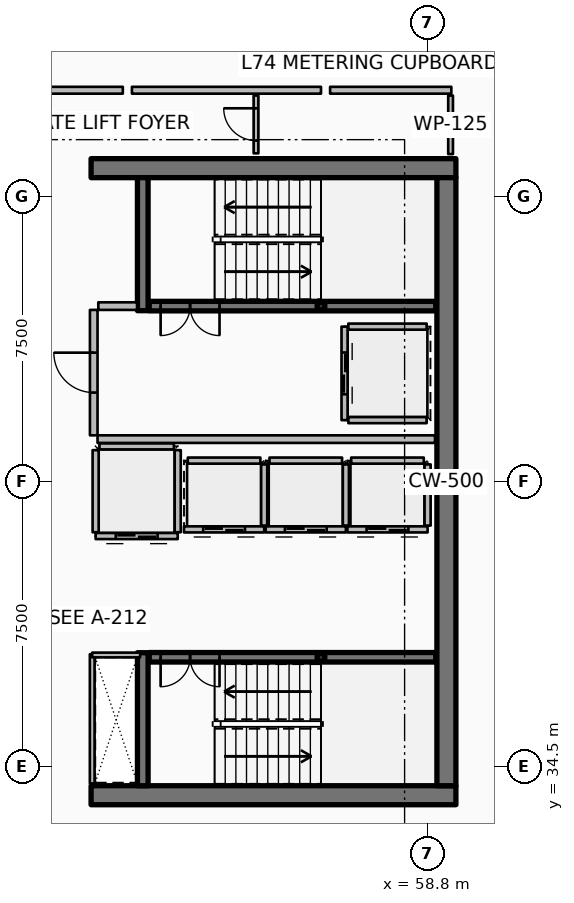
"""IFC4 building model, lengths in metres.
Left out: names, types, materials, properties, quantities, classifications, styles, units other than length and angle.
Written with IfcOpenShell. Run it as: python <this file> out.ifc"""

import sys

from ifc_helpers import new_model, si_unit, direction, frame, frame_2d, origin, origin_2d, place, context, subcontext, project, spatial, rectangle, hollow_rectangle, extrude, element, fill, save


model = new_model("IFC4")
c1 = context("Model", 3, precision=1e-05, world=origin(), true_north=direction((0.0, 1.0)))
c2 = subcontext(c1, "Body", "Model", "MODEL_VIEW")
j1 = project(units=[si_unit("LENGTHUNIT", "METRE"), si_unit("PLANEANGLEUNIT", "RADIAN")], contexts=[c1])
p1 = place(None, origin())
s1 = spatial("IfcSite", under=j1, at=p1, CompositionType="ELEMENT")
p2 = place(p1, origin())
s2 = spatial("IfcBuilding", under=s1, at=p2, CompositionType="ELEMENT")
p3 = place(p2, frame((0.0, 0.0, 294.45)))
s3 = spatial("IfcBuildingStorey", under=s2, at=p3, CompositionType="ELEMENT", Elevation=294.45)
for number, where, z_axis, x_axis in (
    (1, (49.95, 33.75, 0.0), (0.0, 0.0, 1.0), (1.0, 0.0, 0.0)),
    (2, (49.95, 50.25, 0.0), (0.0, 0.0, 1.0), (1.0, 0.0, 0.0)),
):
    element("IfcWall", number, at=place(p3, frame(where, z_axis=z_axis, x_axis=x_axis)), inside=s3, PredefinedType="SHEAR", context=c2, shape_type="SweptSolid", body=[
        extrude(rectangle(XDim=9.6, YDim=0.5, at=frame_2d((4.8, 0.0))), origin(), (0.0, 0.0, 1.0), 3.85),
    ])
p4 = place(p3, frame((59.3, 34.0, 0.0), z_axis=(0.0, 0.0, 1.0), x_axis=(0.0, 1.0, 0.0)))
e3 = element("IfcWall", 3, at=p4, inside=s3, PredefinedType="SHEAR", context=c2, shape_type="SweptSolid", body=[
    extrude(rectangle(XDim=16.0, YDim=0.5, at=frame_2d((8.0, 0.0))), origin(), (0.0, 0.0, 1.0), 3.85),
])
for number, where, z_axis, x_axis in (
    (4, (51.31, 46.5, 0.0), (0.0, 0.0, 1.0), (0.0, 1.0, 0.0)),
    (5, (51.31, 34.0, 0.0), (0.0, 0.0, 1.0), (0.0, 1.0, 0.0)),
):
    element("IfcWall", number, at=place(p3, frame(where, z_axis=z_axis, x_axis=x_axis)), inside=s3, PredefinedType="SHEAR", context=c2, shape_type="SweptSolid", body=[
        extrude(rectangle(XDim=3.5, YDim=0.28, at=frame_2d((1.75, 0.0))), origin(), (0.0, 0.0, 1.0), 3.85),
    ])
for number, where, z_axis, x_axis in (
    (6, (56.0, 46.62, 0.0), (0.0, 0.0, 1.0), (1.0, 0.0, 0.0)),
    (7, (56.0, 37.38, 0.0), (0.0, 0.0, 1.0), (1.0, 0.0, 0.0)),
):
    element("IfcColumn", number, at=place(p3, frame(where, z_axis=z_axis, x_axis=x_axis)), inside=s3, PredefinedType="COLUMN", context=c2, shape_type="SweptSolid", body=[
        extrude(hollow_rectangle(XDim=0.2, YDim=0.2, WallThickness=0.01, InnerFilletRadius=0.01, OuterFilletRadius=0.02, at=origin_2d()), origin(), (0.0, 0.0, 1.0), 1.72),
    ])
p5 = place(p3, frame((51.48, 46.62, 0.0), z_axis=(0.0, 0.0, 1.0), x_axis=(1.0, 0.0, 0.0)))
e8 = element("IfcWall", 8, at=p5, inside=s3, PredefinedType="SOLIDWALL", context=c2, shape_type="SweptSolid", body=[
    extrude(rectangle(XDim=7.54, YDim=0.25, at=frame_2d((3.77, 0.0))), origin(), (0.0, 0.0, 1.0), 3.59),
])
p6 = place(p5, frame((0.3, 0.0, 0.0)))
e9 = element("IfcOpeningElement", 9, at=p6, cuts=e8, PredefinedType="OPENING", context=c2, shape_type="SweptSolid", body=[
    extrude(rectangle(XDim=1.55, YDim=2.15, at=frame_2d((0.775, 1.075))), frame((0.0, 0.135, 0.0), z_axis=(0.0, -1.0, 0.0), x_axis=(1.0, 0.0, 0.0)), (0.0, 0.0, 1.0), 0.27),
])
p7 = place(p3, frame((51.48, 37.38, 0.0), z_axis=(0.0, 0.0, 1.0), x_axis=(1.0, 0.0, 0.0)))
e10 = element("IfcWall", 10, at=p7, inside=s3, PredefinedType="SOLIDWALL", context=c2, shape_type="SweptSolid", body=[
    extrude(rectangle(XDim=7.54, YDim=0.25, at=frame_2d((3.77, 0.0))), origin(), (0.0, 0.0, 1.0), 3.59),
])
p8 = place(p7, frame((0.3, 0.0, 0.0)))
e11 = element("IfcOpeningElement", 11, at=p8, cuts=e10, PredefinedType="OPENING", context=c2, shape_type="SweptSolid", body=[
    extrude(rectangle(XDim=1.55, YDim=2.15, at=frame_2d((0.775, 1.075))), frame((0.0, 0.135, 0.0), z_axis=(0.0, -1.0, 0.0), x_axis=(1.0, 0.0, 0.0)), (0.0, 0.0, 1.0), 0.27),
])
p9 = place(p3, frame((54.505, 40.745, 0.0), z_axis=(0.0, 0.0, 1.0), x_axis=(-1.0, 0.0, 0.0)))
e12 = element("IfcWall", 12, at=p9, inside=s3, PredefinedType="PARTITIONING", context=c2, shape_type="SweptSolid", body=[
    extrude(rectangle(XDim=2.11, YDim=0.16, at=frame_2d((1.055, 0.0))), origin(), (0.0, 0.0, 1.0), 3.59),
])
p10 = place(p9, frame((0.505, 0.0, 0.0)))
e13 = element("IfcOpeningElement", 13, at=p10, cuts=e12, PredefinedType="OPENING", context=c2, shape_type="SweptSolid", body=[
    extrude(rectangle(XDim=1.1, YDim=2.1, at=frame_2d((0.55, 1.05))), frame((0.0, 0.09, 0.0), z_axis=(0.0, -1.0, 0.0), x_axis=(1.0, 0.0, 0.0)), (0.0, 0.0, 1.0), 0.18),
])
p11 = place(p3, frame((54.505, 40.845, 0.0), z_axis=(0.0, 0.0, 1.0), x_axis=(0.0, 1.0, 0.0)))
e14 = element("IfcWall", 14, at=p11, inside=s3, PredefinedType="PARTITIONING", context=c2, shape_type="SweptSolid", body=[
    extrude(rectangle(XDim=1.61, YDim=0.16, at=frame_2d((0.805, 0.0))), origin(), (0.0, 0.0, 1.0), 3.59),
])
p12 = place(p3, frame((52.495, 42.555, 0.0), z_axis=(0.0, 0.0, 1.0), x_axis=(1.0, 0.0, 0.0)))
e15 = element("IfcWall", 15, at=p12, inside=s3, PredefinedType="PARTITIONING", context=c2, shape_type="SweptSolid", body=[
    extrude(rectangle(XDim=1.91, YDim=0.16, at=frame_2d((0.955, 0.0))), origin(), (0.0, 0.0, 1.0), 3.59),
])
p13 = place(p3, frame((56.655, 40.745, 0.0), z_axis=(0.0, 0.0, 1.0), x_axis=(-1.0, 0.0, 0.0)))
e16 = element("IfcWall", 16, at=p13, inside=s3, PredefinedType="PARTITIONING", context=c2, shape_type="SweptSolid", body=[
    extrude(rectangle(XDim=2.11, YDim=0.16, at=frame_2d((1.055, 0.0))), origin(), (0.0, 0.0, 1.0), 3.59),
])
p14 = place(p13, frame((0.505, 0.0, 0.0)))
e17 = element("IfcOpeningElement", 17, at=p14, cuts=e16, PredefinedType="OPENING", context=c2, shape_type="SweptSolid", body=[
    extrude(rectangle(XDim=1.1, YDim=2.1, at=frame_2d((0.55, 1.05))), frame((0.0, 0.09, 0.0), z_axis=(0.0, -1.0, 0.0), x_axis=(1.0, 0.0, 0.0)), (0.0, 0.0, 1.0), 0.18),
])
p15 = place(p3, frame((56.655, 40.845, 0.0), z_axis=(0.0, 0.0, 1.0), x_axis=(0.0, 1.0, 0.0)))
e18 = element("IfcWall", 18, at=p15, inside=s3, PredefinedType="PARTITIONING", context=c2, shape_type="SweptSolid", body=[
    extrude(rectangle(XDim=1.61, YDim=0.16, at=frame_2d((0.805, 0.0))), origin(), (0.0, 0.0, 1.0), 3.59),
])
p16 = place(p3, frame((54.645, 42.555, 0.0), z_axis=(0.0, 0.0, 1.0), x_axis=(1.0, 0.0, 0.0)))
e19 = element("IfcWall", 19, at=p16, inside=s3, PredefinedType="PARTITIONING", context=c2, shape_type="SweptSolid", body=[
    extrude(rectangle(XDim=1.91, YDim=0.16, at=frame_2d((0.955, 0.0))), origin(), (0.0, 0.0, 1.0), 3.59),
])
p17 = place(p3, frame((58.805, 40.745, 0.0), z_axis=(0.0, 0.0, 1.0), x_axis=(-1.0, 0.0, 0.0)))
e20 = element("IfcWall", 20, at=p17, inside=s3, PredefinedType="PARTITIONING", context=c2, shape_type="SweptSolid", body=[
    extrude(rectangle(XDim=2.11, YDim=0.16, at=frame_2d((1.055, 0.0))), origin(), (0.0, 0.0, 1.0), 3.59),
])
p18 = place(p17, frame((0.505, 0.0, 0.0)))
e21 = element("IfcOpeningElement", 21, at=p18, cuts=e20, PredefinedType="OPENING", context=c2, shape_type="SweptSolid", body=[
    extrude(rectangle(XDim=1.1, YDim=2.1, at=frame_2d((0.55, 1.05))), frame((0.0, 0.09, 0.0), z_axis=(0.0, -1.0, 0.0), x_axis=(1.0, 0.0, 0.0)), (0.0, 0.0, 1.0), 0.18),
])
p19 = place(p3, frame((58.805, 40.845, 0.0), z_axis=(0.0, 0.0, 1.0), x_axis=(0.0, 1.0, 0.0)))
e22 = element("IfcWall", 22, at=p19, inside=s3, PredefinedType="PARTITIONING", context=c2, shape_type="SweptSolid", body=[
    extrude(rectangle(XDim=1.61, YDim=0.16, at=frame_2d((0.805, 0.0))), origin(), (0.0, 0.0, 1.0), 3.59),
])
p20 = place(p3, frame((56.795, 42.555, 0.0), z_axis=(0.0, 0.0, 1.0), x_axis=(1.0, 0.0, 0.0)))
e23 = element("IfcWall", 23, at=p20, inside=s3, PredefinedType="PARTITIONING", context=c2, shape_type="SweptSolid", body=[
    extrude(rectangle(XDim=1.91, YDim=0.16, at=frame_2d((0.955, 0.0))), origin(), (0.0, 0.0, 1.0), 3.59),
])
p21 = place(p3, frame((56.62, 46.08, 0.0), z_axis=(0.0, 0.0, 1.0), x_axis=(0.0, -1.0, 0.0)))
e24 = element("IfcWall", 24, at=p21, inside=s3, PredefinedType="PARTITIONING", context=c2, shape_type="SweptSolid", body=[
    extrude(rectangle(XDim=2.46, YDim=0.16, at=frame_2d((1.23, 0.0))), origin(), (0.0, 0.0, 1.0), 3.59),
])
p22 = place(p21, frame((0.68, 0.0, 0.0)))
e25 = element("IfcOpeningElement", 25, at=p22, cuts=e24, PredefinedType="OPENING", context=c2, shape_type="SweptSolid", body=[
    extrude(rectangle(XDim=1.1, YDim=2.1, at=frame_2d((0.55, 1.05))), frame((0.0, 0.09, 0.0), z_axis=(0.0, -1.0, 0.0), x_axis=(1.0, 0.0, 0.0)), (0.0, 0.0, 1.0), 0.18),
])
for number, where, z_axis, x_axis in (
    (26, (56.72, 46.08, 0.0), (0.0, 0.0, 1.0), (1.0, 0.0, 0.0)),
    (27, (56.72, 43.62, 0.0), (0.0, 0.0, 1.0), (1.0, 0.0, 0.0)),
):
    element("IfcWall", number, at=place(p3, frame(where, z_axis=z_axis, x_axis=x_axis)), inside=s3, PredefinedType="PARTITIONING", context=c2, shape_type="SweptSolid", body=[
        extrude(rectangle(XDim=2.06, YDim=0.16, at=frame_2d((1.03, 0.0))), origin(), (0.0, 0.0, 1.0), 3.59),
    ])
p23 = place(p3, frame((52.23, 40.57, 0.0), z_axis=(0.0, 0.0, 1.0), x_axis=(-1.0, 0.0, 0.0)))
e28 = element("IfcWall", 28, at=p23, inside=s3, PredefinedType="PARTITIONING", context=c2, shape_type="SweptSolid", body=[
    extrude(rectangle(XDim=2.16, YDim=0.16, at=frame_2d((1.08, 0.0))), origin(), (0.0, 0.0, 1.0), 3.59),
])
p24 = place(p23, frame((0.53, 0.0, 0.0)))
e29 = element("IfcOpeningElement", 29, at=p24, cuts=e28, PredefinedType="OPENING", context=c2, shape_type="SweptSolid", body=[
    extrude(rectangle(XDim=1.1, YDim=2.1, at=frame_2d((0.55, 1.05))), frame((0.0, 0.09, 0.0), z_axis=(0.0, -1.0, 0.0), x_axis=(1.0, 0.0, 0.0)), (0.0, 0.0, 1.0), 0.18),
])
for number, where, z_axis, x_axis in (
    (30, (52.23, 40.67, 0.0), (0.0, 0.0, 1.0), (0.0, 1.0, 0.0)),
    (31, (50.07, 40.67, 0.0), (0.0, 0.0, 1.0), (0.0, 1.0, 0.0)),
):
    element("IfcWall", number, at=place(p3, frame(where, z_axis=z_axis, x_axis=x_axis)), inside=s3, PredefinedType="PARTITIONING", context=c2, shape_type="SweptSolid", body=[
        extrude(rectangle(XDim=2.16, YDim=0.16, at=frame_2d((1.08, 0.0))), origin(), (0.0, 0.0, 1.0), 3.59),
    ])
p25 = place(p3, frame((50.17, 42.93, 0.0), z_axis=(0.0, 0.0, 1.0), x_axis=(1.0, 0.0, 0.0)))
e32 = element("IfcWall", 32, at=p25, inside=s3, PredefinedType="PARTITIONING", context=c2, shape_type="SweptSolid", body=[
    extrude(rectangle(XDim=1.96, YDim=0.16, at=frame_2d((0.98, 0.0))), origin(), (0.0, 0.0, 1.0), 3.59),
])
p26 = place(p3, frame((50.12, 43.12, 0.0), z_axis=(0.0, 0.0, 1.0), x_axis=(1.0, 0.0, 0.0)))
e33 = element("IfcWall", 33, at=p26, inside=s3, PredefinedType="PARTITIONING", context=c2, shape_type="SweptSolid", body=[
    extrude(rectangle(XDim=8.88, YDim=0.2, at=frame_2d((4.44, 0.0))), origin(), (0.0, 0.0, 1.0), 3.59),
])
p27 = place(p3, frame((50.14, 46.62, 0.0), z_axis=(0.0, 0.0, 1.0), x_axis=(1.0, 0.0, 0.0)))
e34 = element("IfcWall", 34, at=p27, inside=s3, PredefinedType="PARTITIONING", context=c2, shape_type="SweptSolid", body=[
    extrude(rectangle(XDim=1.02, YDim=0.2, at=frame_2d((0.51, 0.0))), origin(), (0.0, 0.0, 1.0), 3.59),
])
p28 = place(p3, frame((50.02, 43.22, 0.0), z_axis=(0.0, 0.0, 1.0), x_axis=(0.0, 1.0, 0.0)))
e35 = element("IfcWall", 35, at=p28, inside=s3, PredefinedType="PARTITIONING", context=c2, shape_type="SweptSolid", body=[
    extrude(rectangle(XDim=3.3, YDim=0.2, at=frame_2d((1.65, 0.0))), origin(), (0.0, 0.0, 1.0), 3.59),
])
p29 = place(p28, frame((1.125, 0.0, 0.0)))
e36 = element("IfcOpeningElement", 36, at=p29, cuts=e35, PredefinedType="OPENING", context=c2, shape_type="SweptSolid", body=[
    extrude(rectangle(XDim=1.05, YDim=2.1, at=frame_2d((0.525, 1.05))), frame((0.0, 0.11, 0.0), z_axis=(0.0, -1.0, 0.0), x_axis=(1.0, 0.0, 0.0)), (0.0, 0.0, 1.0), 0.22),
])
p30 = place(p3, frame((49.98, 34.06, 0.0), z_axis=(0.0, 0.0, 1.0), x_axis=(0.0, 1.0, 0.0)))
e37 = element("IfcWall", 37, at=p30, inside=s3, PredefinedType="PARTITIONING", context=c2, shape_type="SweptSolid", body=[
    extrude(rectangle(XDim=3.4, YDim=0.125, at=frame_2d((1.7, 0.0))), origin(), (0.0, 0.0, 1.0), 3.03),
])
p31 = place(p3, frame((49.98, 37.44, 0.0), z_axis=(0.0, 0.0, 1.0), x_axis=(1.0, 0.0, 0.0)))
e38 = element("IfcWall", 38, at=p31, inside=s3, PredefinedType="PARTITIONING", context=c2, shape_type="SweptSolid", body=[
    extrude(rectangle(XDim=1.26, YDim=0.125, at=frame_2d((0.63, 0.0))), origin(), (0.0, 0.0, 1.0), 3.03),
])
p32 = place(p3, frame((59.41, 50.62, 0.0), z_axis=(0.0, 0.0, 1.0), x_axis=(0.0, 1.0, 0.0)))
e39 = element("IfcWall", 39, at=p32, inside=s3, PredefinedType="PARTITIONING", context=c2, shape_type="SweptSolid", body=[
    extrude(rectangle(XDim=1.54, YDim=0.125, at=frame_2d((0.77, 0.0))), origin(), (0.0, 0.0, 1.0), 3.03),
])
p33 = place(p3, frame((54.29, 50.64, 0.0), z_axis=(0.0, 0.0, 1.0), x_axis=(0.0, 1.0, 0.0)))
e40 = element("IfcWall", 40, at=p33, inside=s3, PredefinedType="PARTITIONING", context=c2, shape_type="SweptSolid", body=[
    extrude(rectangle(XDim=1.52, YDim=0.125, at=frame_2d((0.76, 0.0))), origin(), (0.0, 0.0, 1.0), 3.03),
])
p34 = place(p33, frame((0.335, 0.0, 0.0)))
e41 = element("IfcOpeningElement", 41, at=p34, cuts=e40, PredefinedType="OPENING", context=c2, shape_type="SweptSolid", body=[
    extrude(rectangle(XDim=0.85, YDim=2.06, at=frame_2d((0.425, 1.03))), frame((0.0, 0.073, 0.0), z_axis=(0.0, -1.0, 0.0), x_axis=(1.0, 0.0, 0.0)), (0.0, 0.0, 1.0), 0.145),
])
p35 = place(p3, frame((59.43, 52.3, 0.0), z_axis=(0.0, 0.0, 1.0), x_axis=(-1.0, 0.0, 0.0)))
e42 = element("IfcWall", 42, at=p35, inside=s3, PredefinedType="PARTITIONING", context=c2, shape_type="SweptSolid", body=[
    extrude(rectangle(XDim=3.19, YDim=0.18, at=frame_2d((1.595, 0.0))), origin(), (0.0, 0.0, 1.0), 2.957),
])
p36 = place(p3, frame((62.579, 52.938, 0.0), z_axis=(0.0, 0.0, 1.0), x_axis=(-0.697017998251, 0.717053631268, 0.0)))
e43 = element("IfcWall", 43, at=p36, inside=s3, PredefinedType="PARTITIONING", context=c2, shape_type="SweptSolid", body=[
    extrude(rectangle(XDim=4.618, YDim=0.125, at=frame_2d((2.309, 0.0))), origin(), (0.0, 0.0, 1.0), 2.957),
])
p37 = place(p36, frame((1.859, 0.0, 0.0)))
e44 = element("IfcOpeningElement", 44, at=p37, cuts=e43, PredefinedType="OPENING", context=c2, shape_type="SweptSolid", body=[
    extrude(rectangle(XDim=0.9, YDim=2.08, at=frame_2d((0.45, 1.04))), frame((0.0, 0.073, 0.0), z_axis=(0.0, -1.0, 0.0), x_axis=(1.0, 0.0, 0.0)), (0.0, 0.0, 1.0), 0.145),
])
p38 = place(p3, frame((56.0, 52.3, 0.0), z_axis=(0.0, 0.0, 1.0), x_axis=(-1.0, 0.0, 0.0)))
e45 = element("IfcWall", 45, at=p38, inside=s3, PredefinedType="PARTITIONING", context=c2, shape_type="SweptSolid", body=[
    extrude(rectangle(XDim=4.975, YDim=0.18, at=frame_2d((2.488, 0.0))), origin(), (0.0, 0.0, 1.0), 2.957),
])
p39 = place(p3, frame((50.785, 52.3, 0.0), z_axis=(0.0, 0.0, 1.0), x_axis=(-1.0, 0.0, 0.0)))
e46 = element("IfcWall", 46, at=p39, inside=s3, PredefinedType="PARTITIONING", context=c2, shape_type="SweptSolid", body=[
    extrude(rectangle(XDim=3.884, YDim=0.18, at=frame_2d((1.942, 0.0))), origin(), (0.0, 0.0, 1.0), 2.957),
])
p40 = place(p6, origin())
e47 = element("IfcDoor", 47, at=p40, inside=s3, OperationType="DOUBLE_DOOR_SINGLE_SWING", PredefinedType="DOOR", context=c2, shape_type="SweptSolid", body=[
    extrude(rectangle(XDim=1.55, YDim=2.15, at=frame_2d((0.775, 1.075))), frame((0.0, 0.025, 0.0), z_axis=(0.0, -1.0, 0.0), x_axis=(1.0, 0.0, 0.0)), (0.0, 0.0, 1.0), 0.05),
])
fill(e9, e47)
p41 = place(p8, origin())
e48 = element("IfcDoor", 48, at=p41, inside=s3, OperationType="DOUBLE_DOOR_SINGLE_SWING", PredefinedType="DOOR", context=c2, shape_type="SweptSolid", body=[
    extrude(rectangle(XDim=1.55, YDim=2.15, at=frame_2d((0.775, 1.075))), frame((0.0, 0.025, 0.0), z_axis=(0.0, -1.0, 0.0), x_axis=(1.0, 0.0, 0.0)), (0.0, 0.0, 1.0), 0.05),
])
fill(e11, e48)
p42 = place(p10, origin())
e49 = element("IfcDoor", 49, at=p42, inside=s3, OperationType="DOUBLE_DOOR_SLIDING", PredefinedType="DOOR", context=c2, shape_type="SweptSolid", body=[
    extrude(rectangle(XDim=1.1, YDim=2.1, at=frame_2d((0.55, 1.05))), frame((0.0, 0.025, 0.0), z_axis=(0.0, -1.0, 0.0), x_axis=(1.0, 0.0, 0.0)), (0.0, 0.0, 1.0), 0.05),
])
fill(e13, e49)
p43 = place(p14, origin())
e50 = element("IfcDoor", 50, at=p43, inside=s3, OperationType="DOUBLE_DOOR_SLIDING", PredefinedType="DOOR", context=c2, shape_type="SweptSolid", body=[
    extrude(rectangle(XDim=1.1, YDim=2.1, at=frame_2d((0.55, 1.05))), frame((0.0, 0.025, 0.0), z_axis=(0.0, -1.0, 0.0), x_axis=(1.0, 0.0, 0.0)), (0.0, 0.0, 1.0), 0.05),
])
fill(e17, e50)
p44 = place(p18, origin())
e51 = element("IfcDoor", 51, at=p44, inside=s3, OperationType="DOUBLE_DOOR_SLIDING", PredefinedType="DOOR", context=c2, shape_type="SweptSolid", body=[
    extrude(rectangle(XDim=1.1, YDim=2.1, at=frame_2d((0.55, 1.05))), frame((0.0, 0.025, 0.0), z_axis=(0.0, -1.0, 0.0), x_axis=(1.0, 0.0, 0.0)), (0.0, 0.0, 1.0), 0.05),
])
fill(e21, e51)
p45 = place(p22, origin())
e52 = element("IfcDoor", 52, at=p45, inside=s3, OperationType="DOUBLE_DOOR_SLIDING", PredefinedType="DOOR", context=c2, shape_type="SweptSolid", body=[
    extrude(rectangle(XDim=1.1, YDim=2.1, at=frame_2d((0.55, 1.05))), frame((0.0, 0.025, 0.0), z_axis=(0.0, -1.0, 0.0), x_axis=(1.0, 0.0, 0.0)), (0.0, 0.0, 1.0), 0.05),
])
fill(e25, e52)
p46 = place(p24, origin())
e53 = element("IfcDoor", 53, at=p46, inside=s3, OperationType="DOUBLE_DOOR_SLIDING", PredefinedType="DOOR", context=c2, shape_type="SweptSolid", body=[
    extrude(rectangle(XDim=1.1, YDim=2.1, at=frame_2d((0.55, 1.05))), frame((0.0, 0.025, 0.0), z_axis=(0.0, -1.0, 0.0), x_axis=(1.0, 0.0, 0.0)), (0.0, 0.0, 1.0), 0.05),
])
fill(e29, e53)
p47 = place(p29, origin())
e54 = element("IfcDoor", 54, at=p47, inside=s3, OperationType="SINGLE_SWING_RIGHT", PredefinedType="DOOR", context=c2, shape_type="SweptSolid", body=[
    extrude(rectangle(XDim=1.05, YDim=2.1, at=frame_2d((0.525, 1.05))), frame((0.0, 0.025, 0.0), z_axis=(0.0, -1.0, 0.0), x_axis=(1.0, 0.0, 0.0)), (0.0, 0.0, 1.0), 0.05),
])
fill(e36, e54)
p48 = place(p34, origin())
e55 = element("IfcDoor", 55, at=p48, inside=s3, OperationType="SINGLE_SWING_RIGHT", PredefinedType="DOOR", context=c2, shape_type="SweptSolid", body=[
    extrude(rectangle(XDim=0.85, YDim=2.06, at=frame_2d((0.425, 1.03))), frame((0.0, 0.025, 0.0), z_axis=(0.0, -1.0, 0.0), x_axis=(1.0, 0.0, 0.0)), (0.0, 0.0, 1.0), 0.05),
])
fill(e41, e55)
save(model, sys.argv[1])
